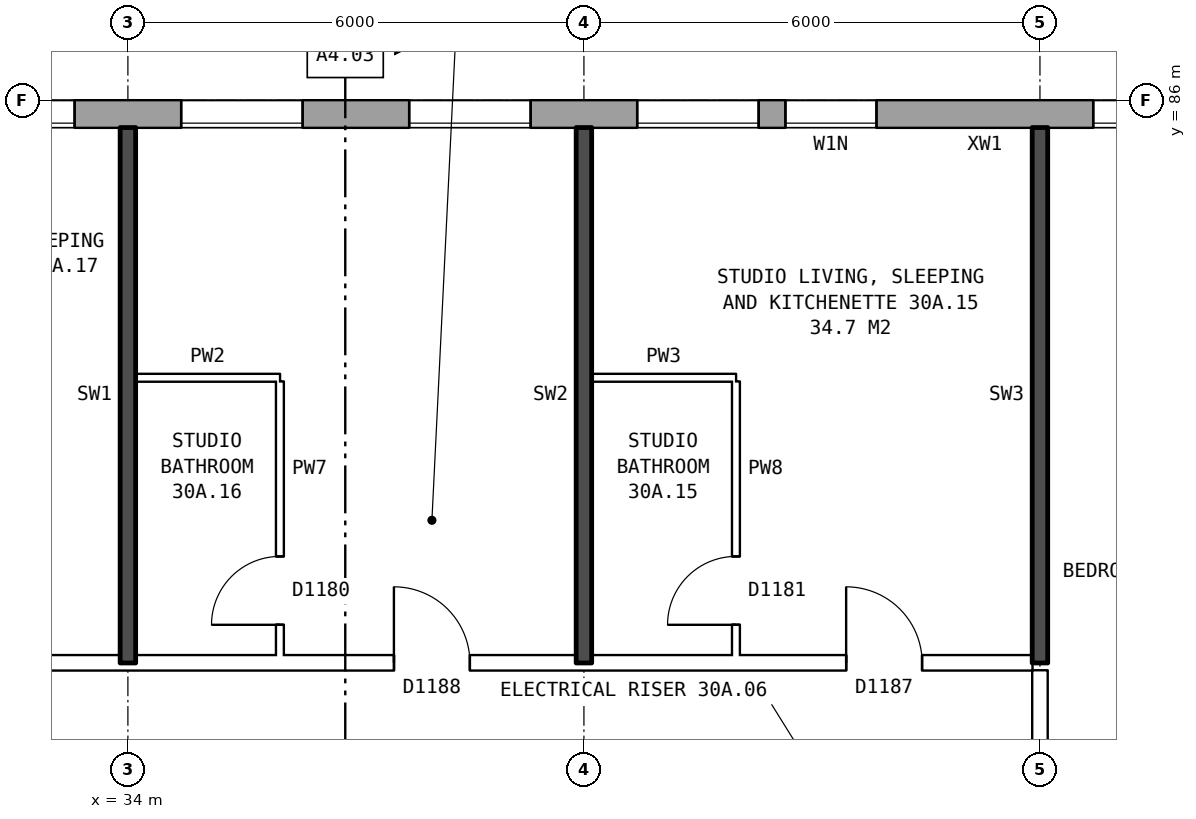
"""IFC4 building model, lengths in metres.
Left out: names, types, materials, properties, quantities, classifications, styles, units other than length and angle.
Written with IfcOpenShell. Run it as: python <this file> out.ifc"""

import sys

from ifc_helpers import new_model, si_unit, direction, frame, frame_2d, origin, place, context, subcontext, project, spatial, rectangle, extrude, element, fill, save


model = new_model("IFC4")
c1 = context("Model", 3, precision=1e-05, world=origin(), true_north=direction((0.0, 1.0)))
c2 = subcontext(c1, "Body", "Model", "MODEL_VIEW")
j1 = project(units=[si_unit("LENGTHUNIT", "METRE"), si_unit("PLANEANGLEUNIT", "RADIAN")], contexts=[c1])
p1 = place(None, origin())
s1 = spatial("IfcSite", under=j1, at=p1, CompositionType="ELEMENT")
p2 = place(p1, origin())
s2 = spatial("IfcBuilding", under=s1, at=p2, CompositionType="ELEMENT")
p3 = place(p2, frame((0.0, 0.0, 108.8)))
s3 = spatial("IfcBuildingStorey", under=s2, at=p3, CompositionType="ELEMENT", Elevation=108.8)
p4 = place(p3, frame((72.925, 85.82, 0.0), z_axis=(0.0, 0.0, 1.0), x_axis=(-1.0, 0.0, 0.0)))
e1 = element("IfcWall", 1, at=p4, inside=s3, PredefinedType="STANDARD", context=c2, shape_type="SweptSolid", body=[
    extrude(rectangle(XDim=44.851, YDim=0.36, at=frame_2d((22.425, 0.0))), origin(), (0.0, 0.0, 1.0), 2.85),
])
p5 = place(p4, frame((0.625, 0.0, 0.8)))
e2 = element("IfcOpeningElement", 2, at=p5, cuts=e1, PredefinedType="OPENING", context=c2, shape_type="SweptSolid", body=[
    extrude(rectangle(XDim=1.6, YDim=1.8, at=frame_2d((0.8, 0.9))), frame((0.0, 0.19, 0.0), z_axis=(0.0, -1.0, 0.0), x_axis=(1.0, 0.0, 0.0)), (0.0, 0.0, 1.0), 0.38),
])
p6 = place(p4, frame((3.625, 0.0, 0.8)))
e3 = element("IfcOpeningElement", 3, at=p6, cuts=e1, PredefinedType="OPENING", context=c2, shape_type="SweptSolid", body=[
    extrude(rectangle(XDim=1.6, YDim=1.8, at=frame_2d((0.8, 0.9))), frame((0.0, 0.19, 0.0), z_axis=(0.0, -1.0, 0.0), x_axis=(1.0, 0.0, 0.0)), (0.0, 0.0, 1.0), 0.38),
])
p7 = place(p4, frame((6.625, 0.0, 0.8)))
e4 = element("IfcOpeningElement", 4, at=p7, cuts=e1, PredefinedType="OPENING", context=c2, shape_type="SweptSolid", body=[
    extrude(rectangle(XDim=1.6, YDim=1.8, at=frame_2d((0.8, 0.9))), frame((0.0, 0.19, 0.0), z_axis=(0.0, -1.0, 0.0), x_axis=(1.0, 0.0, 0.0)), (0.0, 0.0, 1.0), 0.38),
])
p8 = place(p4, frame((9.625, 0.0, 0.8)))
e5 = element("IfcOpeningElement", 5, at=p8, cuts=e1, PredefinedType="OPENING", context=c2, shape_type="SweptSolid", body=[
    extrude(rectangle(XDim=1.6, YDim=1.8, at=frame_2d((0.8, 0.9))), frame((0.0, 0.19, 0.0), z_axis=(0.0, -1.0, 0.0), x_axis=(1.0, 0.0, 0.0)), (0.0, 0.0, 1.0), 0.38),
])
p9 = place(p4, frame((12.625, 0.0, 0.8)))
e6 = element("IfcOpeningElement", 6, at=p9, cuts=e1, PredefinedType="OPENING", context=c2, shape_type="SweptSolid", body=[
    extrude(rectangle(XDim=1.6, YDim=1.8, at=frame_2d((0.8, 0.9))), frame((0.0, 0.19, 0.0), z_axis=(0.0, -1.0, 0.0), x_axis=(1.0, 0.0, 0.0)), (0.0, 0.0, 1.0), 0.38),
])
p10 = place(p4, frame((15.125, 0.0, 1.65)))
e7 = element("IfcOpeningElement", 7, at=p10, cuts=e1, PredefinedType="OPENING", context=c2, shape_type="SweptSolid", body=[
    extrude(rectangle(XDim=1.0, YDim=0.9, at=frame_2d((0.5, 0.45))), frame((0.0, 0.19, 0.0), z_axis=(0.0, -1.0, 0.0), x_axis=(1.0, 0.0, 0.0)), (0.0, 0.0, 1.0), 0.38),
])
p11 = place(p4, frame((18.625, 0.0, 0.8)))
e8 = element("IfcOpeningElement", 8, at=p11, cuts=e1, PredefinedType="OPENING", context=c2, shape_type="SweptSolid", body=[
    extrude(rectangle(XDim=1.6, YDim=1.8, at=frame_2d((0.8, 0.9))), frame((0.0, 0.19, 0.0), z_axis=(0.0, -1.0, 0.0), x_axis=(1.0, 0.0, 0.0)), (0.0, 0.0, 1.0), 0.38),
])
p12 = place(p4, frame((21.625, 0.0, 0.8)))
e9 = element("IfcOpeningElement", 9, at=p12, cuts=e1, PredefinedType="OPENING", context=c2, shape_type="SweptSolid", body=[
    extrude(rectangle(XDim=1.6, YDim=1.8, at=frame_2d((0.8, 0.9))), frame((0.0, 0.19, 0.0), z_axis=(0.0, -1.0, 0.0), x_axis=(1.0, 0.0, 0.0)), (0.0, 0.0, 1.0), 0.38),
])
p13 = place(p4, frame((24.625, 0.0, 0.8)))
e10 = element("IfcOpeningElement", 10, at=p13, cuts=e1, PredefinedType="OPENING", context=c2, shape_type="SweptSolid", body=[
    extrude(rectangle(XDim=1.6, YDim=1.8, at=frame_2d((0.8, 0.9))), frame((0.0, 0.19, 0.0), z_axis=(0.0, -1.0, 0.0), x_axis=(1.0, 0.0, 0.0)), (0.0, 0.0, 1.0), 0.38),
])
p14 = place(p4, frame((29.075, 0.0, 1.4)))
e11 = element("IfcOpeningElement", 11, at=p14, cuts=e1, PredefinedType="OPENING", context=c2, shape_type="SweptSolid", body=[
    extrude(rectangle(XDim=1.2, YDim=1.2, at=frame_2d((0.6, 0.6))), frame((0.0, 0.19, 0.0), z_axis=(0.0, -1.0, 0.0), x_axis=(1.0, 0.0, 0.0)), (0.0, 0.0, 1.0), 0.38),
])
p15 = place(p4, frame((30.625, 0.0, 0.8)))
e12 = element("IfcOpeningElement", 12, at=p15, cuts=e1, PredefinedType="OPENING", context=c2, shape_type="SweptSolid", body=[
    extrude(rectangle(XDim=1.6, YDim=1.8, at=frame_2d((0.8, 0.9))), frame((0.0, 0.19, 0.0), z_axis=(0.0, -1.0, 0.0), x_axis=(1.0, 0.0, 0.0)), (0.0, 0.0, 1.0), 0.38),
])
p16 = place(p4, frame((33.625, 0.0, 0.8)))
e13 = element("IfcOpeningElement", 13, at=p16, cuts=e1, PredefinedType="OPENING", context=c2, shape_type="SweptSolid", body=[
    extrude(rectangle(XDim=1.6, YDim=1.8, at=frame_2d((0.8, 0.9))), frame((0.0, 0.19, 0.0), z_axis=(0.0, -1.0, 0.0), x_axis=(1.0, 0.0, 0.0)), (0.0, 0.0, 1.0), 0.38),
])
p17 = place(p4, frame((36.625, 0.0, 0.8)))
e14 = element("IfcOpeningElement", 14, at=p17, cuts=e1, PredefinedType="OPENING", context=c2, shape_type="SweptSolid", body=[
    extrude(rectangle(XDim=1.6, YDim=1.8, at=frame_2d((0.8, 0.9))), frame((0.0, 0.19, 0.0), z_axis=(0.0, -1.0, 0.0), x_axis=(1.0, 0.0, 0.0)), (0.0, 0.0, 1.0), 0.38),
])
p18 = place(p4, frame((39.625, 0.0, 0.8)))
e15 = element("IfcOpeningElement", 15, at=p18, cuts=e1, PredefinedType="OPENING", context=c2, shape_type="SweptSolid", body=[
    extrude(rectangle(XDim=1.6, YDim=1.8, at=frame_2d((0.8, 0.9))), frame((0.0, 0.19, 0.0), z_axis=(0.0, -1.0, 0.0), x_axis=(1.0, 0.0, 0.0)), (0.0, 0.0, 1.0), 0.38),
])
p19 = place(p4, frame((42.625, 0.0, 0.8)))
e16 = element("IfcOpeningElement", 16, at=p19, cuts=e1, PredefinedType="OPENING", context=c2, shape_type="SweptSolid", body=[
    extrude(rectangle(XDim=1.6, YDim=1.8, at=frame_2d((0.8, 0.9))), frame((0.0, 0.19, 0.0), z_axis=(0.0, -1.0, 0.0), x_axis=(1.0, 0.0, 0.0)), (0.0, 0.0, 1.0), 0.38),
])
p20 = place(p4, frame((16.525, 0.0, 0.15)))
e17 = element("IfcOpeningElement", 17, at=p20, cuts=e1, PredefinedType="OPENING", context=c2, shape_type="SweptSolid", body=[
    extrude(rectangle(XDim=1.2, YDim=0.9, at=frame_2d((0.6, 0.45))), frame((0.0, 0.19, 0.0), z_axis=(0.0, -1.0, 0.0), x_axis=(1.0, 0.0, 0.0)), (0.0, 0.0, 1.0), 0.38),
])
p21 = place(p3, frame((25.36, 78.6, 0.0), z_axis=(0.0, 0.0, 1.0), x_axis=(1.0, 0.0, 0.0)))
e18 = element("IfcWall", 18, at=p21, inside=s3, PredefinedType="PARTITIONING", context=c2, shape_type="SweptSolid", body=[
    extrude(rectangle(XDim=20.54, YDim=0.2, at=frame_2d((10.27, 0.0))), origin(), (0.0, 0.0, 1.0), 2.85),
])
p22 = place(p21, frame((18.09, 0.0, 0.0)))
e19 = element("IfcOpeningElement", 19, at=p22, cuts=e18, PredefinedType="OPENING", context=c2, shape_type="SweptSolid", body=[
    extrude(rectangle(XDim=1.0, YDim=2.1, at=frame_2d((0.5, 1.05))), frame((0.0, 0.11, 0.0), z_axis=(0.0, -1.0, 0.0), x_axis=(1.0, 0.0, 0.0)), (0.0, 0.0, 1.0), 0.22),
])
p23 = place(p21, frame((12.14, 0.0, 0.0)))
e20 = element("IfcOpeningElement", 20, at=p23, cuts=e18, PredefinedType="OPENING", context=c2, shape_type="SweptSolid", body=[
    extrude(rectangle(XDim=1.0, YDim=2.1, at=frame_2d((0.5, 1.05))), frame((0.0, 0.11, 0.0), z_axis=(0.0, -1.0, 0.0), x_axis=(1.0, 0.0, 0.0)), (0.0, 0.0, 1.0), 0.22),
])
p24 = place(p21, frame((6.34, 0.0, 0.0)))
e21 = element("IfcOpeningElement", 21, at=p24, cuts=e18, PredefinedType="OPENING", context=c2, shape_type="SweptSolid", body=[
    extrude(rectangle(XDim=1.0, YDim=2.1, at=frame_2d((0.5, 1.05))), frame((0.0, 0.11, 0.0), z_axis=(0.0, -1.0, 0.0), x_axis=(1.0, 0.0, 0.0)), (0.0, 0.0, 1.0), 0.22),
])
for number, where, z_axis, x_axis in (
    (22, (34.1, 82.35, 0.0), (0.0, 0.0, 1.0), (1.0, 0.0, 0.0)),
    (23, (40.1, 82.35, 0.0), (0.0, 0.0, 1.0), (1.0, 0.0, 0.0)),
):
    element("IfcWall", number, at=place(p3, frame(where, z_axis=z_axis, x_axis=x_axis)), inside=s3, PredefinedType="PARTITIONING", context=c2, shape_type="SweptSolid", body=[
        extrude(rectangle(XDim=1.9, YDim=0.1, at=frame_2d((0.95, 0.0))), origin(), (0.0, 0.0, 1.0), 2.85),
    ])
p25 = place(p3, frame((34.0, 78.6, 0.0), z_axis=(0.0, 0.0, 1.0), x_axis=(0.0, 1.0, 0.0)))
e24 = element("IfcWall", 24, at=p25, inside=s3, PredefinedType="SOLIDWALL", context=c2, shape_type="SweptSolid", body=[
    extrude(rectangle(XDim=7.04, YDim=0.2, at=frame_2d((3.52, 0.0))), origin(), (0.0, 0.0, 1.0), 2.85),
])
p26 = place(p3, frame((36.0, 78.7, 0.0), z_axis=(0.0, 0.0, 1.0), x_axis=(0.0, 1.0, 0.0)))
e25 = element("IfcWall", 25, at=p26, inside=s3, PredefinedType="PARTITIONING", context=c2, shape_type="SweptSolid", body=[
    extrude(rectangle(XDim=3.6, YDim=0.1, at=frame_2d((1.8, 0.0))), origin(), (0.0, 0.0, 1.0), 2.85),
])
p27 = place(p26, frame((0.4, 0.0, 0.0)))
e26 = element("IfcOpeningElement", 26, at=p27, cuts=e25, PredefinedType="OPENING", context=c2, shape_type="SweptSolid", body=[
    extrude(rectangle(XDim=0.9, YDim=2.1, at=frame_2d((0.45, 1.05))), frame((0.0, 0.06, 0.0), z_axis=(0.0, -1.0, 0.0), x_axis=(1.0, 0.0, 0.0)), (0.0, 0.0, 1.0), 0.12),
])
p28 = place(p3, frame((40.0, 78.6, 0.0), z_axis=(0.0, 0.0, 1.0), x_axis=(0.0, 1.0, 0.0)))
e27 = element("IfcWall", 27, at=p28, inside=s3, PredefinedType="SOLIDWALL", context=c2, shape_type="SweptSolid", body=[
    extrude(rectangle(XDim=7.04, YDim=0.2, at=frame_2d((3.52, 0.0))), origin(), (0.0, 0.0, 1.0), 2.85),
])
p29 = place(p3, frame((42.0, 78.7, 0.0), z_axis=(0.0, 0.0, 1.0), x_axis=(0.0, 1.0, 0.0)))
e28 = element("IfcWall", 28, at=p29, inside=s3, PredefinedType="PARTITIONING", context=c2, shape_type="SweptSolid", body=[
    extrude(rectangle(XDim=3.6, YDim=0.1, at=frame_2d((1.8, 0.0))), origin(), (0.0, 0.0, 1.0), 2.85),
])
p30 = place(p29, frame((0.4, 0.0, 0.0)))
e29 = element("IfcOpeningElement", 29, at=p30, cuts=e28, PredefinedType="OPENING", context=c2, shape_type="SweptSolid", body=[
    extrude(rectangle(XDim=0.9, YDim=2.1, at=frame_2d((0.45, 1.05))), frame((0.0, 0.06, 0.0), z_axis=(0.0, -1.0, 0.0), x_axis=(1.0, 0.0, 0.0)), (0.0, 0.0, 1.0), 0.12),
])
p31 = place(p3, frame((46.0, 76.3, 0.0), z_axis=(0.0, 0.0, 1.0), x_axis=(0.0, 1.0, 0.0)))
e30 = element("IfcWall", 30, at=p31, inside=s3, PredefinedType="PARTITIONING", context=c2, shape_type="SweptSolid", body=[
    extrude(rectangle(XDim=2.2, YDim=0.2, at=frame_2d((1.1, 0.0))), origin(), (0.0, 0.0, 1.0), 2.85),
])
p32 = place(p3, frame((46.0, 78.6, 0.0), z_axis=(0.0, 0.0, 1.0), x_axis=(0.0, 1.0, 0.0)))
e31 = element("IfcWall", 31, at=p32, inside=s3, PredefinedType="SOLIDWALL", context=c2, shape_type="SweptSolid", body=[
    extrude(rectangle(XDim=7.04, YDim=0.2, at=frame_2d((3.52, 0.0))), origin(), (0.0, 0.0, 1.0), 2.85),
])
p33 = place(p13, origin())
e32 = element("IfcWindow", 32, at=p33, inside=s3, PartitioningType="SINGLE_PANEL", PredefinedType="WINDOW", context=c2, shape_type="SweptSolid", body=[
    extrude(rectangle(XDim=1.6, YDim=1.8, at=frame_2d((0.8, 0.9))), frame((0.0, 0.15, 0.0), z_axis=(0.0, -1.0, 0.0), x_axis=(1.0, 0.0, 0.0)), (0.0, 0.0, 1.0), 0.06),
])
fill(e10, e32)
p34 = place(p14, origin())
e33 = element("IfcWindow", 33, at=p34, inside=s3, PartitioningType="SINGLE_PANEL", PredefinedType="WINDOW", context=c2, shape_type="SweptSolid", body=[
    extrude(rectangle(XDim=1.2, YDim=1.2, at=frame_2d((0.6, 0.6))), frame((0.0, 0.15, 0.0), z_axis=(0.0, -1.0, 0.0), x_axis=(1.0, 0.0, 0.0)), (0.0, 0.0, 1.0), 0.06),
])
fill(e11, e33)
p35 = place(p15, origin())
e34 = element("IfcWindow", 34, at=p35, inside=s3, PartitioningType="SINGLE_PANEL", PredefinedType="WINDOW", context=c2, shape_type="SweptSolid", body=[
    extrude(rectangle(XDim=1.6, YDim=1.8, at=frame_2d((0.8, 0.9))), frame((0.0, 0.15, 0.0), z_axis=(0.0, -1.0, 0.0), x_axis=(1.0, 0.0, 0.0)), (0.0, 0.0, 1.0), 0.06),
])
fill(e12, e34)
p36 = place(p16, origin())
e35 = element("IfcWindow", 35, at=p36, inside=s3, PartitioningType="SINGLE_PANEL", PredefinedType="WINDOW", context=c2, shape_type="SweptSolid", body=[
    extrude(rectangle(XDim=1.6, YDim=1.8, at=frame_2d((0.8, 0.9))), frame((0.0, 0.15, 0.0), z_axis=(0.0, -1.0, 0.0), x_axis=(1.0, 0.0, 0.0)), (0.0, 0.0, 1.0), 0.06),
])
fill(e13, e35)
p37 = place(p17, origin())
e36 = element("IfcWindow", 36, at=p37, inside=s3, PartitioningType="SINGLE_PANEL", PredefinedType="WINDOW", context=c2, shape_type="SweptSolid", body=[
    extrude(rectangle(XDim=1.6, YDim=1.8, at=frame_2d((0.8, 0.9))), frame((0.0, 0.15, 0.0), z_axis=(0.0, -1.0, 0.0), x_axis=(1.0, 0.0, 0.0)), (0.0, 0.0, 1.0), 0.06),
])
fill(e14, e36)
p38 = place(p18, origin())
e37 = element("IfcWindow", 37, at=p38, inside=s3, PartitioningType="SINGLE_PANEL", PredefinedType="WINDOW", context=c2, shape_type="SweptSolid", body=[
    extrude(rectangle(XDim=1.6, YDim=1.8, at=frame_2d((0.8, 0.9))), frame((0.0, 0.15, 0.0), z_axis=(0.0, -1.0, 0.0), x_axis=(1.0, 0.0, 0.0)), (0.0, 0.0, 1.0), 0.06),
])
fill(e15, e37)
p39 = place(p22, origin())
e38 = element("IfcDoor", 38, at=p39, inside=s3, OperationType="SINGLE_SWING_LEFT", PredefinedType="DOOR", context=c2, shape_type="SweptSolid", body=[
    extrude(rectangle(XDim=1.0, YDim=2.1, at=frame_2d((0.5, 1.05))), frame((0.0, 0.025, 0.0), z_axis=(0.0, -1.0, 0.0), x_axis=(1.0, 0.0, 0.0)), (0.0, 0.0, 1.0), 0.05),
])
fill(e19, e38)
p40 = place(p30, origin())
e39 = element("IfcDoor", 39, at=p40, inside=s3, OperationType="SINGLE_SWING_LEFT", PredefinedType="DOOR", context=c2, shape_type="SweptSolid", body=[
    extrude(rectangle(XDim=0.9, YDim=2.1, at=frame_2d((0.45, 1.05))), frame((0.0, 0.025, 0.0), z_axis=(0.0, -1.0, 0.0), x_axis=(1.0, 0.0, 0.0)), (0.0, 0.0, 1.0), 0.05),
])
fill(e29, e39)
p41 = place(p23, origin())
e40 = element("IfcDoor", 40, at=p41, inside=s3, OperationType="SINGLE_SWING_LEFT", PredefinedType="DOOR", context=c2, shape_type="SweptSolid", body=[
    extrude(rectangle(XDim=1.0, YDim=2.1, at=frame_2d((0.5, 1.05))), frame((0.0, 0.025, 0.0), z_axis=(0.0, -1.0, 0.0), x_axis=(1.0, 0.0, 0.0)), (0.0, 0.0, 1.0), 0.05),
])
fill(e20, e40)
p42 = place(p27, origin())
e41 = element("IfcDoor", 41, at=p42, inside=s3, OperationType="SINGLE_SWING_LEFT", PredefinedType="DOOR", context=c2, shape_type="SweptSolid", body=[
    extrude(rectangle(XDim=0.9, YDim=2.1, at=frame_2d((0.45, 1.05))), frame((0.0, 0.025, 0.0), z_axis=(0.0, -1.0, 0.0), x_axis=(1.0, 0.0, 0.0)), (0.0, 0.0, 1.0), 0.05),
])
fill(e26, e41)
save(model, sys.argv[1])
